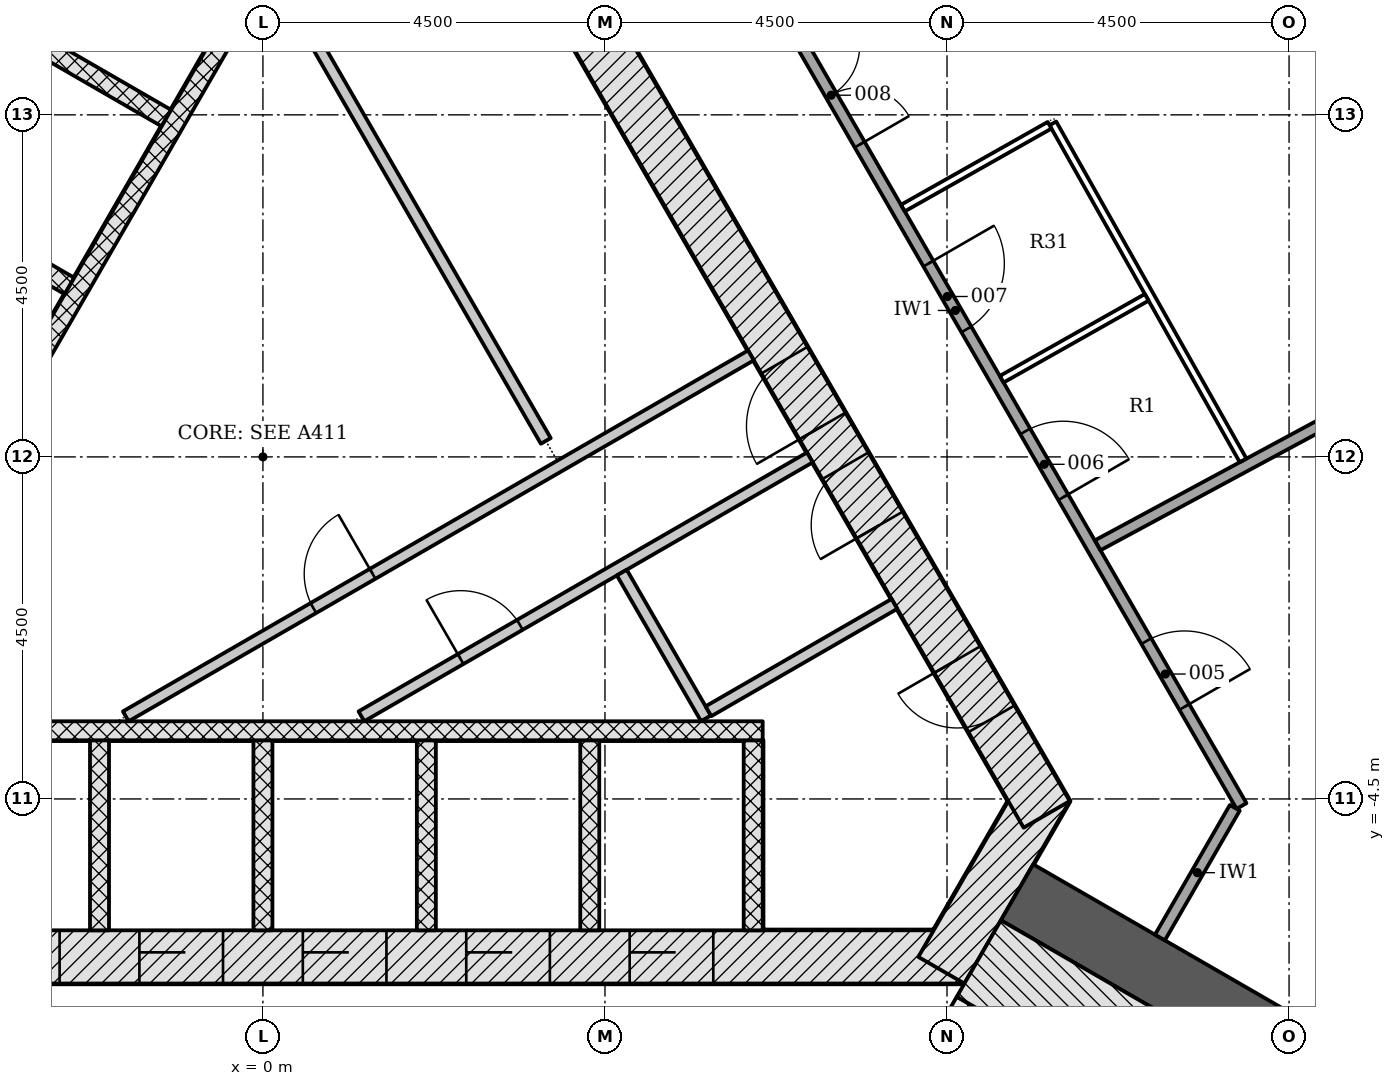
"""IFC4 building model, lengths in metres.
Left out: names, types, materials, properties, quantities, classifications, styles, units other than length and angle.
Written with IfcOpenShell. Run it as: python <this file> out.ifc"""

import sys

from ifc_helpers import new_model, si_unit, direction, frame, frame_2d, origin, place, context, subcontext, project, spatial, rectangle, extrude, element, fill, save


model = new_model("IFC4")
c1 = context("Model", 3, precision=1e-05, world=origin(), true_north=direction((0.0, 1.0)))
c2 = subcontext(c1, "Body", "Model", "MODEL_VIEW")
j1 = project(units=[si_unit("LENGTHUNIT", "METRE"), si_unit("PLANEANGLEUNIT", "RADIAN")], contexts=[c1])
p1 = place(None, origin())
s1 = spatial("IfcSite", under=j1, at=p1, CompositionType="ELEMENT")
p2 = place(p1, origin())
s2 = spatial("IfcBuilding", under=s1, at=p2, CompositionType="ELEMENT")
p3 = place(p2, frame((0.0, 0.0, 79.8)))
s3 = spatial("IfcBuildingStorey", under=s2, at=p3, CompositionType="ELEMENT", Elevation=79.8)
p4 = place(p3, frame((-9.229, -6.578, -0.2), z_axis=(0.0, 0.0, 1.0), x_axis=(1.0, 0.0, 0.0)))
e1 = element("IfcWall", 1, at=p4, inside=s3, PredefinedType="SHEAR", context=c2, shape_type="SweptSolid", body=[
    extrude(rectangle(XDim=18.458, YDim=0.7, at=frame_2d((9.229, 0.0))), origin(), (0.0, 0.0, 1.0), 3.6),
])
p5 = place(p4, frame((3.304, 0.0, 0.2)))
e2 = element("IfcOpeningElement", 2, at=p5, cuts=e1, PredefinedType="OPENING", context=c2, shape_type="SweptSolid", body=[
    extrude(rectangle(XDim=1.1, YDim=2.1, at=frame_2d((0.55, 1.05))), frame((0.0, 0.36, 0.0), z_axis=(0.0, -1.0, 0.0), x_axis=(1.0, 0.0, 0.0)), (0.0, 0.0, 1.0), 0.72),
])
p6 = place(p4, frame((5.454, 0.0, 0.2)))
e3 = element("IfcOpeningElement", 3, at=p6, cuts=e1, PredefinedType="OPENING", context=c2, shape_type="SweptSolid", body=[
    extrude(rectangle(XDim=1.1, YDim=2.1, at=frame_2d((0.55, 1.05))), frame((0.0, 0.36, 0.0), z_axis=(0.0, -1.0, 0.0), x_axis=(1.0, 0.0, 0.0)), (0.0, 0.0, 1.0), 0.72),
])
p7 = place(p4, frame((7.604, 0.0, 0.2)))
e4 = element("IfcOpeningElement", 4, at=p7, cuts=e1, PredefinedType="OPENING", context=c2, shape_type="SweptSolid", body=[
    extrude(rectangle(XDim=1.1, YDim=2.1, at=frame_2d((0.55, 1.05))), frame((0.0, 0.36, 0.0), z_axis=(0.0, -1.0, 0.0), x_axis=(1.0, 0.0, 0.0)), (0.0, 0.0, 1.0), 0.72),
])
p8 = place(p4, frame((9.754, 0.0, 0.2)))
e5 = element("IfcOpeningElement", 5, at=p8, cuts=e1, PredefinedType="OPENING", context=c2, shape_type="SweptSolid", body=[
    extrude(rectangle(XDim=1.1, YDim=2.1, at=frame_2d((0.55, 1.05))), frame((0.0, 0.36, 0.0), z_axis=(0.0, -1.0, 0.0), x_axis=(1.0, 0.0, 0.0)), (0.0, 0.0, 1.0), 0.72),
])
p9 = place(p4, frame((11.904, 0.0, 0.2)))
e6 = element("IfcOpeningElement", 6, at=p9, cuts=e1, PredefinedType="OPENING", context=c2, shape_type="SweptSolid", body=[
    extrude(rectangle(XDim=1.1, YDim=2.1, at=frame_2d((0.55, 1.05))), frame((0.0, 0.36, 0.0), z_axis=(0.0, -1.0, 0.0), x_axis=(1.0, 0.0, 0.0)), (0.0, 0.0, 1.0), 0.72),
])
p10 = place(p4, frame((14.054, 0.0, 0.2)))
e7 = element("IfcOpeningElement", 7, at=p10, cuts=e1, PredefinedType="OPENING", context=c2, shape_type="SweptSolid", body=[
    extrude(rectangle(XDim=1.1, YDim=2.1, at=frame_2d((0.55, 1.05))), frame((0.0, 0.36, 0.0), z_axis=(0.0, -1.0, 0.0), x_axis=(1.0, 0.0, 0.0)), (0.0, 0.0, 1.0), 0.72),
])
p11 = place(p4, frame((1.026, 0.0, 0.2)))
e8 = element("IfcOpeningElement", 8, at=p11, cuts=e1, PredefinedType="OPENING", context=c2, shape_type="SweptSolid", body=[
    extrude(rectangle(XDim=0.9, YDim=2.1, at=frame_2d((0.45, 1.05))), frame((0.0, 0.36, 0.0), z_axis=(0.0, -1.0, 0.0), x_axis=(1.0, 0.0, 0.0)), (0.0, 0.0, 1.0), 0.72),
])
p12 = place(p3, frame((8.926, -6.753, -0.2), z_axis=(0.0, 0.0, 1.0), x_axis=(0.500042739161, 0.866000726912, 0.0)))
e9 = element("IfcWall", 9, at=p12, inside=s3, PredefinedType="SHEAR", context=c2, shape_type="SweptSolid", body=[
    extrude(rectangle(XDim=2.771, YDim=0.7, at=frame_2d((1.386, 0.0))), origin(), (0.0, 0.0, 1.0), 3.6),
])
p13 = place(p3, frame((10.311, -4.703, -0.2), z_axis=(0.0, 0.0, 1.0), x_axis=(-0.500001446645, 0.866024568562, 0.0)))
e10 = element("IfcWall", 10, at=p13, inside=s3, PredefinedType="SHEAR", context=c2, shape_type="SweptSolid", body=[
    extrude(rectangle(XDim=18.458, YDim=0.7, at=frame_2d((9.229, 0.0))), origin(), (0.0, 0.0, 1.0), 3.6),
])
p14 = place(p13, frame((5.9, 0.0, 0.2)))
e11 = element("IfcOpeningElement", 11, at=p14, cuts=e10, PredefinedType="OPENING", context=c2, shape_type="SweptSolid", body=[
    extrude(rectangle(XDim=1.0, YDim=2.1, at=frame_2d((0.5, 1.05))), frame((0.0, 0.36, 0.0), z_axis=(0.0, -1.0, 0.0), x_axis=(1.0, 0.0, 0.0)), (0.0, 0.0, 1.0), 0.72),
])
p15 = place(p13, frame((1.452, 0.0, 0.2)))
e12 = element("IfcOpeningElement", 12, at=p15, cuts=e10, PredefinedType="OPENING", context=c2, shape_type="SweptSolid", body=[
    extrude(rectangle(XDim=0.9, YDim=2.1, at=frame_2d((0.45, 1.05))), frame((0.0, 0.36, 0.0), z_axis=(0.0, -1.0, 0.0), x_axis=(1.0, 0.0, 0.0)), (0.0, 0.0, 1.0), 0.72),
])
p16 = place(p13, frame((4.396, 0.0, 0.2)))
e13 = element("IfcOpeningElement", 13, at=p16, cuts=e10, PredefinedType="OPENING", context=c2, shape_type="SweptSolid", body=[
    extrude(rectangle(XDim=0.9, YDim=2.1, at=frame_2d((0.45, 1.05))), frame((0.0, 0.36, 0.0), z_axis=(0.0, -1.0, 0.0), x_axis=(1.0, 0.0, 0.0)), (0.0, 0.0, 1.0), 0.72),
])
p17 = place(p13, frame((13.023, 0.0, 0.2)))
e14 = element("IfcOpeningElement", 14, at=p17, cuts=e10, PredefinedType="OPENING", context=c2, shape_type="SweptSolid", body=[
    extrude(rectangle(XDim=0.9, YDim=2.1, at=frame_2d((0.45, 1.05))), frame((0.0, 0.36, 0.0), z_axis=(0.0, -1.0, 0.0), x_axis=(1.0, 0.0, 0.0)), (0.0, 0.0, 1.0), 0.72),
])
p18 = place(p3, frame((-1.083, 11.281, -0.2), z_axis=(0.0, 0.0, 1.0), x_axis=(-0.500001446645, -0.866024568562, 0.0)))
e15 = element("IfcWall", 15, at=p18, inside=s3, PredefinedType="SHEAR", context=c2, shape_type="SweptSolid", body=[
    extrude(rectangle(XDim=18.458, YDim=0.7, at=frame_2d((9.229, 0.0))), origin(), (0.0, 0.0, 1.0), 3.6),
])
p19 = place(p18, frame((8.979, 0.0, 0.2)))
e16 = element("IfcOpeningElement", 16, at=p19, cuts=e15, PredefinedType="OPENING", context=c2, shape_type="SweptSolid", body=[
    extrude(rectangle(XDim=1.2, YDim=2.1, at=frame_2d((0.6, 1.05))), frame((0.0, 0.36, 0.0), z_axis=(0.0, -1.0, 0.0), x_axis=(1.0, 0.0, 0.0)), (0.0, 0.0, 1.0), 0.72),
])
p20 = place(p18, frame((11.029, 0.0, 0.2)))
e17 = element("IfcOpeningElement", 17, at=p20, cuts=e15, PredefinedType="OPENING", context=c2, shape_type="SweptSolid", body=[
    extrude(rectangle(XDim=1.2, YDim=2.1, at=frame_2d((0.6, 1.05))), frame((0.0, 0.36, 0.0), z_axis=(0.0, -1.0, 0.0), x_axis=(1.0, 0.0, 0.0)), (0.0, 0.0, 1.0), 0.72),
])
p21 = place(p3, frame((9.922, -5.728, -0.2), z_axis=(0.0, 0.0, 1.0), x_axis=(0.866026565165, -0.499997988424, 0.0)))
e18 = element("IfcWall", 18, at=p21, inside=s3, PredefinedType="SHEAR", context=c2, shape_type="SweptSolid", body=[
    extrude(rectangle(XDim=13.064, YDim=0.85, at=frame_2d((6.532, 0.0))), origin(), (0.0, 0.0, 1.0), 3.6),
])
for number, where, z_axis, x_axis in (
    (19, (-2.15, -6.228, -0.2), (0.0, 0.0, 1.0), (0.0, 1.0, 0.0)),
    (20, (0.0, -6.228, -0.2), (0.0, 0.0, 1.0), (0.0, 1.0, 0.0)),
    (21, (2.15, -6.228, -0.2), (0.0, 0.0, 1.0), (0.0, 1.0, 0.0)),
    (22, (4.3, -6.228, -0.2), (0.0, 0.0, 1.0), (0.0, 1.0, 0.0)),
    (23, (6.45, -6.228, -0.2), (0.0, 0.0, 1.0), (0.0, 1.0, 0.0)),
):
    element("IfcWall", number, at=place(p3, frame(where, z_axis=z_axis, x_axis=x_axis)), inside=s3, PredefinedType="PARTITIONING", context=c2, shape_type="SweptSolid", body=[
        extrude(rectangle(XDim=2.5, YDim=0.25, at=frame_2d((1.25, 0.0))), origin(), (0.0, 0.0, 1.0), 3.6),
    ])
p22 = place(p3, frame((-6.575, -3.603, 0.0), z_axis=(0.0, 0.0, 1.0), x_axis=(1.0, 0.0, 0.0)))
e24 = element("IfcWall", 24, at=p22, inside=s3, PredefinedType="PARTITIONING", context=c2, shape_type="SweptSolid", body=[
    extrude(rectangle(XDim=13.15, YDim=0.25, at=frame_2d((6.575, 0.0))), origin(), (0.0, 0.0, 1.0), 3.4),
])
for number, where, z_axis, x_axis in (
    (25, (-3.781, 5.907, -0.2), (0.0, 0.0, 1.0), (0.866, -0.5, 0.0)),
    (26, (-5.056, 3.699, -0.2), (0.0, 0.0, 1.0), (0.866, -0.5, 0.0)),
):
    element("IfcWall", number, at=place(p3, frame(where, z_axis=z_axis, x_axis=x_axis)), inside=s3, PredefinedType="PARTITIONING", context=c2, shape_type="SweptSolid", body=[
        extrude(rectangle(XDim=2.9, YDim=0.25, at=frame_2d((1.45, 0.0))), origin(), (0.0, 0.0, 1.0), 3.6),
    ])
p23 = place(p3, frame((0.176, 6.711, 0.0), z_axis=(0.0, 0.0, 1.0), x_axis=(-0.500004227369, -0.866022963098, 0.0)))
e27 = element("IfcWall", 27, at=p23, inside=s3, PredefinedType="PARTITIONING", context=c2, shape_type="SweptSolid", body=[
    extrude(rectangle(XDim=11.8, YDim=0.25, at=frame_2d((5.9, 0.0))), origin(), (0.0, 0.0, 1.0), 3.4),
])
p24 = place(p3, frame((-1.804, -3.413, 0.0), z_axis=(0.0, 0.0, 1.0), x_axis=(0.866035761792, 0.499982058975, 0.0)))
e28 = element("IfcWall", 28, at=p24, inside=s3, PredefinedType="PARTITIONING", context=c2, shape_type="SweptSolid", body=[
    extrude(rectangle(XDim=9.497, YDim=0.15, at=frame_2d((4.749, 0.0))), origin(), (0.0, 0.0, 1.0), 3.4),
])
p25 = place(p24, frame((2.85, 0.0, 0.0)))
e29 = element("IfcOpeningElement", 29, at=p25, cuts=e28, PredefinedType="OPENING", context=c2, shape_type="SweptSolid", body=[
    extrude(rectangle(XDim=0.9, YDim=2.1, at=frame_2d((0.45, 1.05))), frame((0.0, 0.085, 0.0), z_axis=(0.0, -1.0, 0.0), x_axis=(1.0, 0.0, 0.0)), (0.0, 0.0, 1.0), 0.17),
])
p26 = place(p3, frame((3.722, 0.21, 0.0), z_axis=(0.0, 0.0, 1.0), x_axis=(-0.500005825834, 0.866022040212, 0.0)))
e30 = element("IfcWall", 30, at=p26, inside=s3, PredefinedType="PARTITIONING", context=c2, shape_type="SweptSolid", body=[
    extrude(rectangle(XDim=7.11, YDim=0.15, at=frame_2d((3.555, 0.0))), origin(), (0.0, 0.0, 1.0), 3.4),
])
p27 = place(p3, frame((1.296, -3.413, 0.0), z_axis=(0.0, 0.0, 1.0), x_axis=(0.866029230515, 0.49999337185, 0.0)))
e31 = element("IfcWall", 31, at=p27, inside=s3, PredefinedType="PARTITIONING", context=c2, shape_type="SweptSolid", body=[
    extrude(rectangle(XDim=6.812, YDim=0.15, at=frame_2d((3.406, 0.0))), origin(), (0.0, 0.0, 1.0), 3.4),
])
p28 = place(p27, frame((1.507, 0.0, 0.0)))
e32 = element("IfcOpeningElement", 32, at=p28, cuts=e31, PredefinedType="OPENING", context=c2, shape_type="SweptSolid", body=[
    extrude(rectangle(XDim=0.9, YDim=2.1, at=frame_2d((0.45, 1.05))), frame((0.0, 0.085, 0.0), z_axis=(0.0, -1.0, 0.0), x_axis=(1.0, 0.0, 0.0)), (0.0, 0.0, 1.0), 0.17),
])
p29 = place(p3, frame((5.829, -3.439, 0.0), z_axis=(0.0, 0.0, 1.0), x_axis=(-0.49995790319, 0.866049707025, 0.0)))
e33 = element("IfcWall", 33, at=p29, inside=s3, PredefinedType="PARTITIONING", context=c2, shape_type="SweptSolid", body=[
    extrude(rectangle(XDim=2.214, YDim=0.15, at=frame_2d((1.107, 0.0))), origin(), (0.0, 0.0, 1.0), 3.4),
])
p30 = place(p3, frame((5.862, -3.346, 0.0), z_axis=(0.0, 0.0, 1.0), x_axis=(0.866011447264, 0.500024172624, 0.0)))
e34 = element("IfcWall", 34, at=p30, inside=s3, PredefinedType="PARTITIONING", context=c2, shape_type="SweptSolid", body=[
    extrude(rectangle(XDim=2.825, YDim=0.15, at=frame_2d((1.413, 0.0))), origin(), (0.0, 0.0, 1.0), 3.4),
])
p31 = place(p3, frame((7.44, -10.226, -0.2), z_axis=(0.0, 0.0, 1.0), x_axis=(0.500022077904, 0.866012656725, 0.0)))
e35 = element("IfcWall", 35, at=p31, inside=s3, PredefinedType="SHEAR", context=c2, shape_type="SweptSolid", body=[
    extrude(rectangle(XDim=3.55, YDim=0.2, at=frame_2d((1.775, 0.0))), origin(), (0.0, 0.0, 1.0), 3.6),
])
p32 = place(p31, frame((1.175, 0.0, 0.2)))
e36 = element("IfcOpeningElement", 36, at=p32, cuts=e35, PredefinedType="OPENING", context=c2, shape_type="SweptSolid", body=[
    extrude(rectangle(XDim=1.2, YDim=2.1, at=frame_2d((0.6, 1.05))), frame((0.0, 0.11, 0.0), z_axis=(0.0, -1.0, 0.0), x_axis=(1.0, 0.0, 0.0)), (0.0, 0.0, 1.0), 0.22),
])
p33 = place(p3, frame((9.419, -6.599, -0.2), z_axis=(0.0, 0.0, 1.0), x_axis=(0.866033125095, -0.499986626058, 0.0)))
e37 = element("IfcWall", 37, at=p33, inside=s3, PredefinedType="SHEAR", context=c2, shape_type="SweptSolid", body=[
    extrude(rectangle(XDim=7.2, YDim=1.161, at=frame_2d((3.6, 0.0))), origin(), (0.0, 0.0, 1.0), 3.6),
])
p34 = place(p3, frame((5.346, 8.446, 0.0), z_axis=(0.0, 0.0, 1.0), x_axis=(0.500008781656, -0.866020333634, 0.0)))
e38 = element("IfcWall", 38, at=p34, inside=s3, PredefinedType="PARTITIONING", context=c2, shape_type="SweptSolid", body=[
    extrude(rectangle(XDim=15.057, YDim=0.15, at=frame_2d((7.528, 0.0))), origin(), (0.0, 0.0, 1.0), 2.778),
])
p35 = place(p34, frame((12.552, 0.0, 0.0)))
e39 = element("IfcOpeningElement", 39, at=p35, cuts=e38, PredefinedType="OPENING", context=c2, shape_type="SweptSolid", body=[
    extrude(rectangle(XDim=1.0, YDim=2.1, at=frame_2d((0.5, 1.05))), frame((0.0, 0.085, 0.0), z_axis=(0.0, -1.0, 0.0), x_axis=(1.0, 0.0, 0.0)), (0.0, 0.0, 1.0), 0.17),
])
p36 = place(p34, frame((9.365, 0.0, 0.0)))
e40 = element("IfcOpeningElement", 40, at=p36, cuts=e38, PredefinedType="OPENING", context=c2, shape_type="SweptSolid", body=[
    extrude(rectangle(XDim=1.0, YDim=2.1, at=frame_2d((0.5, 1.05))), frame((0.0, 0.085, 0.0), z_axis=(0.0, -1.0, 0.0), x_axis=(1.0, 0.0, 0.0)), (0.0, 0.0, 1.0), 0.17),
])
p37 = place(p34, frame((6.816, 0.0, 0.0)))
e41 = element("IfcOpeningElement", 41, at=p37, cuts=e38, PredefinedType="OPENING", context=c2, shape_type="SweptSolid", body=[
    extrude(rectangle(XDim=1.0, YDim=2.1, at=frame_2d((0.5, 1.05))), frame((0.0, 0.085, 0.0), z_axis=(0.0, -1.0, 0.0), x_axis=(1.0, 0.0, 0.0)), (0.0, 0.0, 1.0), 0.17),
])
p38 = place(p34, frame((3.509, 0.0, 0.0)))
e42 = element("IfcOpeningElement", 42, at=p38, cuts=e38, PredefinedType="OPENING", context=c2, shape_type="SweptSolid", body=[
    extrude(rectangle(XDim=1.5, YDim=2.1, at=frame_2d((0.75, 1.05))), frame((0.0, 0.085, 0.0), z_axis=(0.0, -1.0, 0.0), x_axis=(1.0, 0.0, 0.0)), (0.0, 0.0, 1.0), 0.17),
])
p39 = place(p3, frame((11.801, -6.323, 0.0), z_axis=(0.0, 0.0, 1.0), x_axis=(0.500058665202, 0.865991530765, 0.0)))
e43 = element("IfcWall", 43, at=p39, inside=s3, PredefinedType="PARTITIONING", context=c2, shape_type="SweptSolid", body=[
    extrude(rectangle(XDim=1.969, YDim=0.15, at=frame_2d((0.985, 0.0))), origin(), (0.0, 0.0, 1.0), 2.778),
])
p40 = place(p3, frame((17.829, 2.528, 0.0), z_axis=(0.0, 0.0, 1.0), x_axis=(-0.880268417521, -0.474476040612, 0.0)))
e44 = element("IfcWall", 44, at=p40, inside=s3, PredefinedType="PARTITIONING", context=c2, shape_type="SweptSolid", body=[
    extrude(rectangle(XDim=7.777, YDim=0.15, at=frame_2d((3.889, 0.0))), origin(), (0.0, 0.0, 1.0), 2.778),
])
p41 = place(p3, frame((12.895, -0.046, 0.0), z_axis=(0.0, 0.0, 1.0), x_axis=(-0.491519870282, 0.870866360079, 0.0)))
e45 = element("IfcWall", 45, at=p41, inside=s3, PredefinedType="PARTITIONING", context=c2, shape_type="SweptSolid", body=[
    extrude(rectangle(XDim=5.091, YDim=0.1, at=frame_2d((2.545, 0.0))), origin(), (0.0, 0.0, 1.0), 2.778),
])
p42 = place(p3, frame((10.349, 4.363, 0.0), z_axis=(0.0, 0.0, 1.0), x_axis=(-0.870794636378, -0.491646927435, 0.0)))
e46 = element("IfcWall", 46, at=p42, inside=s3, PredefinedType="PARTITIONING", context=c2, shape_type="SweptSolid", body=[
    extrude(rectangle(XDim=2.216, YDim=0.1, at=frame_2d((1.108, 0.0))), origin(), (0.0, 0.0, 1.0), 3.4),
])
p43 = place(p3, frame((11.627, 2.099, 0.0), z_axis=(0.0, 0.0, 1.0), x_axis=(-0.870851244214, -0.491546651348, 0.0)))
e47 = element("IfcWall", 47, at=p43, inside=s3, PredefinedType="PARTITIONING", context=c2, shape_type="SweptSolid", body=[
    extrude(rectangle(XDim=2.19, YDim=0.1, at=frame_2d((1.095, 0.0))), origin(), (0.0, 0.0, 1.0), 3.4),
])
p44 = place(p6, origin())
e48 = element("IfcDoor", 48, at=p44, inside=s3, OperationType="DOUBLE_DOOR_SLIDING", PredefinedType="DOOR", context=c2, shape_type="SweptSolid", body=[
    extrude(rectangle(XDim=1.1, YDim=2.1, at=frame_2d((0.55, 1.05))), frame((0.0, 0.025, 0.0), z_axis=(0.0, -1.0, 0.0), x_axis=(1.0, 0.0, 0.0)), (0.0, 0.0, 1.0), 0.05),
])
fill(e3, e48)
p45 = place(p7, origin())
e49 = element("IfcDoor", 49, at=p45, inside=s3, OperationType="DOUBLE_DOOR_SLIDING", PredefinedType="DOOR", context=c2, shape_type="SweptSolid", body=[
    extrude(rectangle(XDim=1.1, YDim=2.1, at=frame_2d((0.55, 1.05))), frame((0.0, 0.025, 0.0), z_axis=(0.0, -1.0, 0.0), x_axis=(1.0, 0.0, 0.0)), (0.0, 0.0, 1.0), 0.05),
])
fill(e4, e49)
p46 = place(p8, origin())
e50 = element("IfcDoor", 50, at=p46, inside=s3, OperationType="DOUBLE_DOOR_SLIDING", PredefinedType="DOOR", context=c2, shape_type="SweptSolid", body=[
    extrude(rectangle(XDim=1.1, YDim=2.1, at=frame_2d((0.55, 1.05))), frame((0.0, 0.025, 0.0), z_axis=(0.0, -1.0, 0.0), x_axis=(1.0, 0.0, 0.0)), (0.0, 0.0, 1.0), 0.05),
])
fill(e5, e50)
p47 = place(p9, origin())
e51 = element("IfcDoor", 51, at=p47, inside=s3, OperationType="DOUBLE_DOOR_SLIDING", PredefinedType="DOOR", context=c2, shape_type="SweptSolid", body=[
    extrude(rectangle(XDim=1.1, YDim=2.1, at=frame_2d((0.55, 1.05))), frame((0.0, 0.025, 0.0), z_axis=(0.0, -1.0, 0.0), x_axis=(1.0, 0.0, 0.0)), (0.0, 0.0, 1.0), 0.05),
])
fill(e6, e51)
p48 = place(p10, origin())
e52 = element("IfcDoor", 52, at=p48, inside=s3, OperationType="DOUBLE_DOOR_SLIDING", PredefinedType="DOOR", context=c2, shape_type="SweptSolid", body=[
    extrude(rectangle(XDim=1.1, YDim=2.1, at=frame_2d((0.55, 1.05))), frame((0.0, 0.025, 0.0), z_axis=(0.0, -1.0, 0.0), x_axis=(1.0, 0.0, 0.0)), (0.0, 0.0, 1.0), 0.05),
])
fill(e7, e52)
p49 = place(p14, origin())
e53 = element("IfcDoor", 53, at=p49, inside=s3, OperationType="SINGLE_SWING_LEFT", PredefinedType="DOOR", context=c2, shape_type="SweptSolid", body=[
    extrude(rectangle(XDim=1.0, YDim=2.1, at=frame_2d((0.5, 1.05))), frame((0.0, 0.075, 0.0), z_axis=(0.0, -1.0, 0.0), x_axis=(1.0, 0.0, 0.0)), (0.0, 0.0, 1.0), 0.15),
])
fill(e11, e53)
p50 = place(p15, origin())
e54 = element("IfcDoor", 54, at=p50, inside=s3, OperationType="SINGLE_SWING_RIGHT", PredefinedType="DOOR", context=c2, shape_type="SweptSolid", body=[
    extrude(rectangle(XDim=0.9, YDim=2.1, at=frame_2d((0.45, 1.05))), frame((0.0, 0.075, 0.0), z_axis=(0.0, -1.0, 0.0), x_axis=(1.0, 0.0, 0.0)), (0.0, 0.0, 1.0), 0.15),
])
fill(e12, e54)
p51 = place(p16, origin())
e55 = element("IfcDoor", 55, at=p51, inside=s3, OperationType="SINGLE_SWING_LEFT", PredefinedType="DOOR", context=c2, shape_type="SweptSolid", body=[
    extrude(rectangle(XDim=0.9, YDim=2.1, at=frame_2d((0.45, 1.05))), frame((0.0, 0.075, 0.0), z_axis=(0.0, -1.0, 0.0), x_axis=(1.0, 0.0, 0.0)), (0.0, 0.0, 1.0), 0.15),
])
fill(e13, e55)
p52 = place(p28, origin())
e56 = element("IfcDoor", 56, at=p52, inside=s3, OperationType="SINGLE_SWING_LEFT", PredefinedType="DOOR", context=c2, shape_type="SweptSolid", body=[
    extrude(rectangle(XDim=0.9, YDim=2.1, at=frame_2d((0.45, 1.05))), frame((0.0, 0.025, 0.0), z_axis=(0.0, -1.0, 0.0), x_axis=(1.0, 0.0, 0.0)), (0.0, 0.0, 1.0), 0.05),
])
fill(e32, e56)
p53 = place(p25, origin())
e57 = element("IfcDoor", 57, at=p53, inside=s3, OperationType="SINGLE_SWING_RIGHT", PredefinedType="DOOR", context=c2, shape_type="SweptSolid", body=[
    extrude(rectangle(XDim=0.9, YDim=2.1, at=frame_2d((0.45, 1.05))), frame((0.0, 0.025, 0.0), z_axis=(0.0, -1.0, 0.0), x_axis=(1.0, 0.0, 0.0)), (0.0, 0.0, 1.0), 0.05),
])
fill(e29, e57)
p54 = place(p35, origin())
e58 = element("IfcDoor", 58, at=p54, inside=s3, OperationType="SINGLE_SWING_RIGHT", PredefinedType="DOOR", context=c2, shape_type="SweptSolid", body=[
    extrude(rectangle(XDim=1.0, YDim=2.1, at=frame_2d((0.5, 1.05))), frame((0.0, 0.025, 0.0), z_axis=(0.0, -1.0, 0.0), x_axis=(1.0, 0.0, 0.0)), (0.0, 0.0, 1.0), 0.05),
])
fill(e39, e58)
p55 = place(p36, origin())
e59 = element("IfcDoor", 59, at=p55, inside=s3, OperationType="SINGLE_SWING_RIGHT", PredefinedType="DOOR", context=c2, shape_type="SweptSolid", body=[
    extrude(rectangle(XDim=1.0, YDim=2.1, at=frame_2d((0.5, 1.05))), frame((0.0, 0.025, 0.0), z_axis=(0.0, -1.0, 0.0), x_axis=(1.0, 0.0, 0.0)), (0.0, 0.0, 1.0), 0.05),
])
fill(e40, e59)
p56 = place(p37, origin())
e60 = element("IfcDoor", 60, at=p56, inside=s3, OperationType="SINGLE_SWING_LEFT", PredefinedType="DOOR", context=c2, shape_type="SweptSolid", body=[
    extrude(rectangle(XDim=1.0, YDim=2.1, at=frame_2d((0.5, 1.05))), frame((0.0, 0.025, 0.0), z_axis=(0.0, -1.0, 0.0), x_axis=(1.0, 0.0, 0.0)), (0.0, 0.0, 1.0), 0.05),
])
fill(e41, e60)
p57 = place(p38, origin())
e61 = element("IfcDoor", 61, at=p57, inside=s3, OperationType="DOUBLE_DOOR_SINGLE_SWING", PredefinedType="DOOR", context=c2, shape_type="SweptSolid", body=[
    extrude(rectangle(XDim=1.5, YDim=2.1, at=frame_2d((0.75, 1.05))), frame((0.0, 0.025, 0.0), z_axis=(0.0, -1.0, 0.0), x_axis=(1.0, 0.0, 0.0)), (0.0, 0.0, 1.0), 0.05),
])
fill(e42, e61)
save(model, sys.argv[1])
